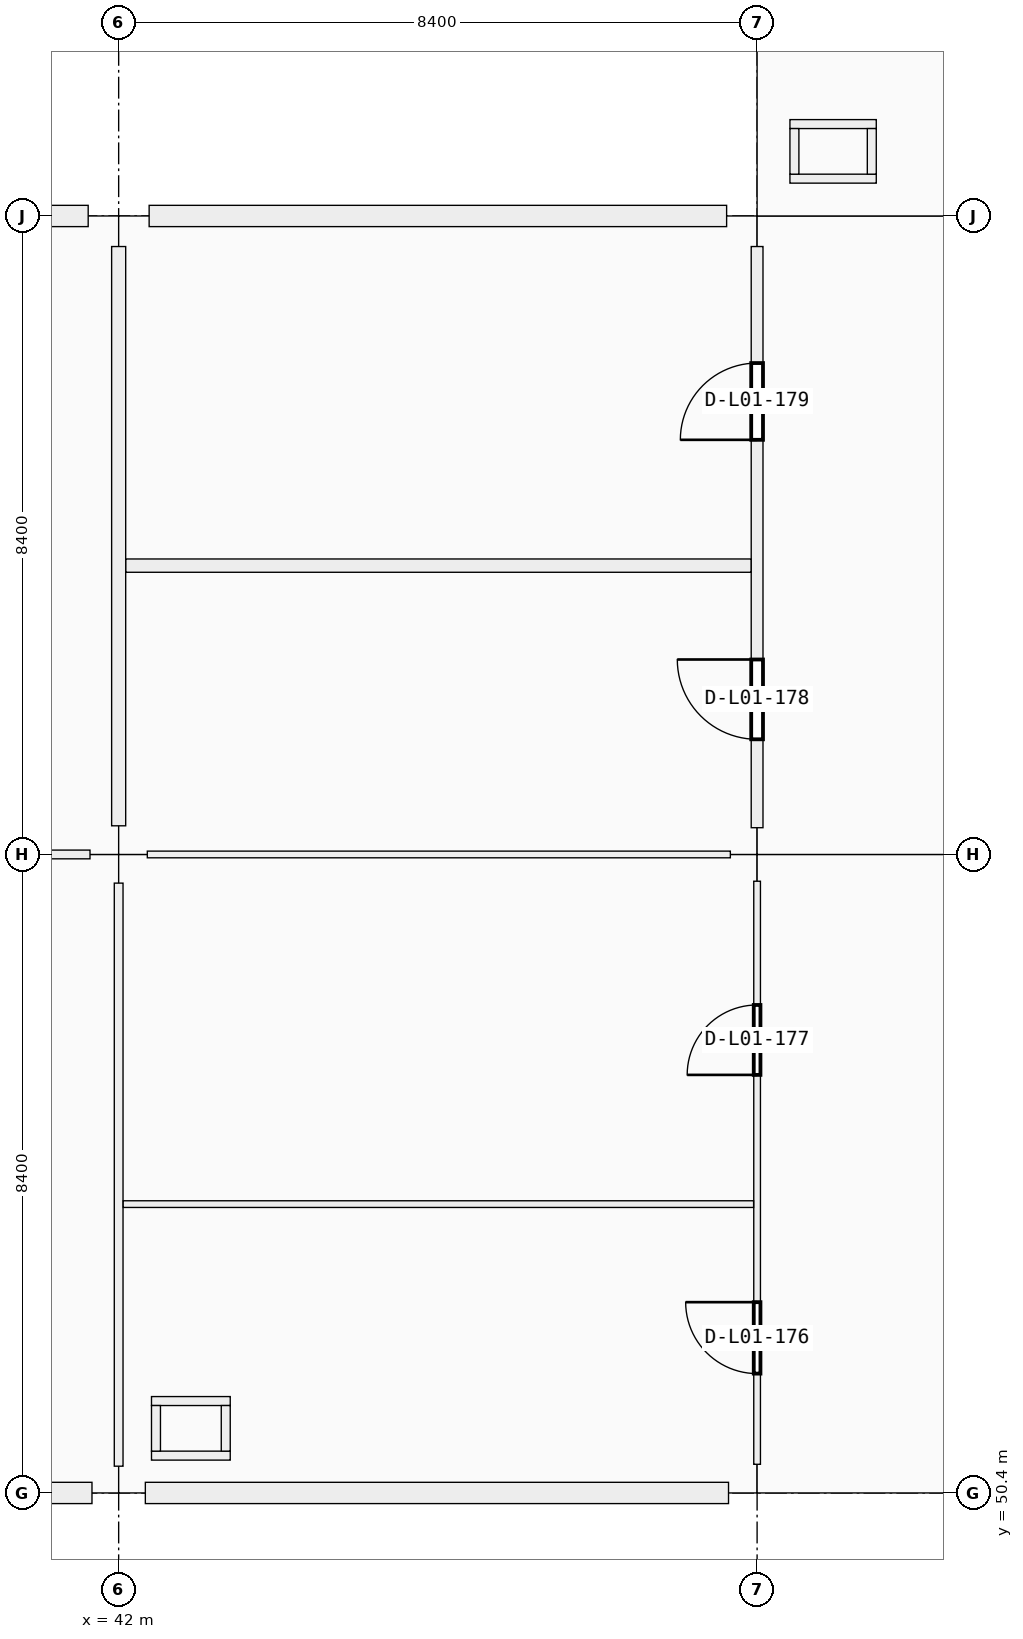
"""IFC4 building model, lengths in metres.
Left out: names, types, materials, properties, quantities, classifications, styles, units other than length and angle.
Written with IfcOpenShell. Run it as: python <this file> out.ifc"""

import sys

from ifc_helpers import new_model, si_unit, direction, frame, frame_2d, origin, origin_2d, place, context, subcontext, project, spatial, rectangle, extrude, element, fill, save


model = new_model("IFC4")
c1 = context("Model", 3, precision=1e-05, world=origin(), true_north=direction((0.0, 1.0)))
c2 = subcontext(c1, "Body", "Model", "MODEL_VIEW")
j1 = project(units=[si_unit("LENGTHUNIT", "METRE"), si_unit("PLANEANGLEUNIT", "RADIAN")], contexts=[c1])
p1 = place(None, origin())
s1 = spatial("IfcSite", under=j1, at=p1, CompositionType="ELEMENT")
p2 = place(p1, origin())
s2 = spatial("IfcBuilding", under=s1, at=p2, CompositionType="ELEMENT")
p3 = place(p2, frame((0.0, 0.0, 5.76)))
s3 = spatial("IfcBuildingStorey", under=s2, at=p3, CompositionType="ELEMENT", Elevation=5.76)
p4 = place(p3, frame((42.0, 50.4, 0.0), z_axis=(0.0, 0.0, 1.0), x_axis=(1.0, 0.0, 0.0)))
e1 = element("IfcColumn", 1, at=p4, inside=s3, PredefinedType="COLUMN", context=c2, shape_type="SweptSolid", body=[
    extrude(rectangle(XDim=0.7, YDim=0.7, at=origin_2d()), origin(), (0.0, 0.0, 1.0), 4.5),
])
p5 = place(p3, frame((42.0, 58.8, 0.0), z_axis=(0.0, 0.0, 1.0), x_axis=(1.0, 0.0, 0.0)))
e2 = element("IfcColumn", 2, at=p5, inside=s3, PredefinedType="COLUMN", context=c2, shape_type="SweptSolid", body=[
    extrude(rectangle(XDim=0.75, YDim=0.75, at=origin_2d()), origin(), (0.0, 0.0, 1.0), 4.5),
])
p6 = place(p3, frame((42.0, 67.2, 0.0), z_axis=(0.0, 0.0, 1.0), x_axis=(1.0, 0.0, 0.0)))
e3 = element("IfcColumn", 3, at=p6, inside=s3, PredefinedType="COLUMN", context=c2, shape_type="SweptSolid", body=[
    extrude(rectangle(XDim=0.8, YDim=0.8, at=origin_2d()), origin(), (0.0, 0.0, 1.0), 4.5),
])
p7 = place(p3, frame((50.4, 50.4, 0.0), z_axis=(0.0, 0.0, 1.0), x_axis=(1.0, 0.0, 0.0)))
e4 = element("IfcColumn", 4, at=p7, inside=s3, PredefinedType="COLUMN", context=c2, shape_type="SweptSolid", body=[
    extrude(rectangle(XDim=0.75, YDim=0.75, at=origin_2d()), origin(), (0.0, 0.0, 1.0), 4.5),
])
p8 = place(p3, frame((50.4, 58.8, 0.0), z_axis=(0.0, 0.0, 1.0), x_axis=(1.0, 0.0, 0.0)))
e5 = element("IfcColumn", 5, at=p8, inside=s3, PredefinedType="COLUMN", context=c2, shape_type="SweptSolid", body=[
    extrude(rectangle(XDim=0.7, YDim=0.7, at=origin_2d()), origin(), (0.0, 0.0, 1.0), 4.5),
])
p9 = place(p3, frame((50.4, 67.2, 0.0), z_axis=(0.0, 0.0, 1.0), x_axis=(1.0, 0.0, 0.0)))
e6 = element("IfcColumn", 6, at=p9, inside=s3, PredefinedType="COLUMN", context=c2, shape_type="SweptSolid", body=[
    extrude(rectangle(XDim=0.8, YDim=0.8, at=origin_2d()), origin(), (0.0, 0.0, 1.0), 4.5),
])
p10 = place(p3, frame((41.649, 50.4, 0.0), z_axis=(0.0, 0.0, 1.0), x_axis=(-1.0, 0.0, 0.0)))
e7 = element("IfcWall", 7, at=p10, inside=s3, PredefinedType="SOLIDWALL", context=c2, shape_type="SweptSolid", body=[
    extrude(rectangle(XDim=7.648, YDim=0.28, at=frame_2d((3.824, 0.0))), origin(), (0.0, 0.0, 1.0), 3.4),
])
p11 = place(p3, frame((34.001, 67.2, 0.0), z_axis=(0.0, 0.0, 1.0), x_axis=(1.0, 0.0, 0.0)))
e8 = element("IfcWall", 8, at=p11, inside=s3, PredefinedType="SOLIDWALL", context=c2, shape_type="SweptSolid", body=[
    extrude(rectangle(XDim=7.598, YDim=0.28, at=frame_2d((3.799, 0.0))), origin(), (0.0, 0.0, 1.0), 3.4),
])
p12 = place(p11, frame((3.149, 0.0, 0.9)))
e9 = element("IfcOpeningElement", 9, at=p12, cuts=e8, PredefinedType="OPENING", context=c2, shape_type="SweptSolid", body=[
    extrude(rectangle(XDim=1.3, YDim=1.95, at=frame_2d((0.65, 0.975))), frame((0.0, 0.14, 0.0), z_axis=(0.0, -1.0, 0.0), x_axis=(1.0, 0.0, 0.0)), (0.0, 0.0, 1.0), 0.28),
])
p13 = place(p3, frame((50.024, 50.4, 0.0), z_axis=(0.0, 0.0, 1.0), x_axis=(-1.0, 0.0, 0.0)))
e10 = element("IfcWall", 10, at=p13, inside=s3, PredefinedType="SOLIDWALL", context=c2, shape_type="SweptSolid", body=[
    extrude(rectangle(XDim=7.673, YDim=0.28, at=frame_2d((3.836, 0.0))), origin(), (0.0, 0.0, 1.0), 3.4),
])
p14 = place(p13, frame((2.462, 0.0, 0.9)))
e11 = element("IfcOpeningElement", 11, at=p14, cuts=e10, PredefinedType="OPENING", context=c2, shape_type="SweptSolid", body=[
    extrude(rectangle(XDim=2.75, YDim=1.6, at=frame_2d((1.375, 0.8))), frame((0.0, 0.14, 0.0), z_axis=(0.0, -1.0, 0.0), x_axis=(1.0, 0.0, 0.0)), (0.0, 0.0, 1.0), 0.28),
])
p15 = place(p3, frame((42.401, 67.2, 0.0), z_axis=(0.0, 0.0, 1.0), x_axis=(1.0, 0.0, 0.0)))
e12 = element("IfcWall", 12, at=p15, inside=s3, PredefinedType="SOLIDWALL", context=c2, shape_type="SweptSolid", body=[
    extrude(rectangle(XDim=7.598, YDim=0.28, at=frame_2d((3.799, 0.0))), origin(), (0.0, 0.0, 1.0), 3.4),
])
p16 = place(p15, frame((3.024, 0.0, 0.9)))
e13 = element("IfcOpeningElement", 13, at=p16, cuts=e12, PredefinedType="OPENING", context=c2, shape_type="SweptSolid", body=[
    extrude(rectangle(XDim=1.55, YDim=1.6, at=frame_2d((0.775, 0.8))), frame((0.0, 0.14, 0.0), z_axis=(0.0, -1.0, 0.0), x_axis=(1.0, 0.0, 0.0)), (0.0, 0.0, 1.0), 0.28),
])
for number, where, z_axis, x_axis in (
    (14, (42.432, 50.891, 0.0), (0.0, 0.0, 1.0), (1.0, 0.0, 0.0)),
    (15, (42.432, 51.609, 0.0), (0.0, 0.0, 1.0), (1.0, 0.0, 0.0)),
):
    element("IfcWall", number, at=place(p3, frame(where, z_axis=z_axis, x_axis=x_axis)), inside=s3, PredefinedType="PARTITIONING", context=c2, shape_type="SweptSolid", body=[
        extrude(rectangle(XDim=1.036, YDim=0.118, at=frame_2d((0.518, 0.0))), origin(), (0.0, 0.0, 1.0), 3.48),
    ])
for number, where, z_axis, x_axis in (
    (16, (42.491, 50.95, 0.0), (0.0, 0.0, 1.0), (0.0, 1.0, 0.0)),
    (17, (43.409, 50.95, 0.0), (0.0, 0.0, 1.0), (0.0, 1.0, 0.0)),
):
    element("IfcWall", number, at=place(p3, frame(where, z_axis=z_axis, x_axis=x_axis)), inside=s3, PredefinedType="PARTITIONING", context=c2, shape_type="SweptSolid", body=[
        extrude(rectangle(XDim=0.6, YDim=0.118, at=frame_2d((0.3, 0.0))), origin(), (0.0, 0.0, 1.0), 3.48),
    ])
for number, where, z_axis, x_axis in (
    (18, (50.832, 67.691, 0.0), (0.0, 0.0, 1.0), (1.0, 0.0, 0.0)),
    (19, (50.832, 68.409, 0.0), (0.0, 0.0, 1.0), (1.0, 0.0, 0.0)),
):
    element("IfcWall", number, at=place(p3, frame(where, z_axis=z_axis, x_axis=x_axis)), inside=s3, PredefinedType="PARTITIONING", context=c2, shape_type="SweptSolid", body=[
        extrude(rectangle(XDim=1.136, YDim=0.118, at=frame_2d((0.568, 0.0))), origin(), (0.0, 0.0, 1.0), 3.48),
    ])
for number, where, z_axis, x_axis in (
    (20, (50.891, 67.75, 0.0), (0.0, 0.0, 1.0), (0.0, 1.0, 0.0)),
    (21, (51.909, 67.75, 0.0), (0.0, 0.0, 1.0), (0.0, 1.0, 0.0)),
):
    element("IfcWall", number, at=place(p3, frame(where, z_axis=z_axis, x_axis=x_axis)), inside=s3, PredefinedType="PARTITIONING", context=c2, shape_type="SweptSolid", body=[
        extrude(rectangle(XDim=0.6, YDim=0.118, at=frame_2d((0.3, 0.0))), origin(), (0.0, 0.0, 1.0), 3.48),
    ])
p17 = place(p3, frame((34.002, 58.8, 0.0), z_axis=(0.0, 0.0, 1.0), x_axis=(1.0, 0.0, 0.0)))
e22 = element("IfcWall", 22, at=p17, inside=s3, PredefinedType="PARTITIONING", context=c2, shape_type="SweptSolid", body=[
    extrude(rectangle(XDim=7.621, YDim=0.115, at=frame_2d((3.811, 0.0))), origin(), (0.0, 0.0, 1.0), 2.4),
])
p18 = place(p17, frame((3.28, 0.0, 0.0)))
e23 = element("IfcOpeningElement", 23, at=p18, cuts=e22, PredefinedType="OPENING", context=c2, shape_type="SweptSolid", body=[
    extrude(rectangle(XDim=1.06, YDim=2.22, at=frame_2d((0.53, 1.11))), frame((0.0, 0.058, 0.0), z_axis=(0.0, -1.0, 0.0), x_axis=(1.0, 0.0, 0.0)), (0.0, 0.0, 1.0), 0.115),
])
p19 = place(p3, frame((42.377, 58.8, 0.0), z_axis=(0.0, 0.0, 1.0), x_axis=(1.0, 0.0, 0.0)))
e24 = element("IfcWall", 24, at=p19, inside=s3, PredefinedType="PARTITIONING", context=c2, shape_type="SweptSolid", body=[
    extrude(rectangle(XDim=7.671, YDim=0.088, at=frame_2d((3.835, 0.0))), origin(), (0.0, 0.0, 1.0), 2.4),
])
p20 = place(p3, frame((42.0, 50.752, 0.0), z_axis=(0.0, 0.0, 1.0), x_axis=(0.0, 1.0, 0.0)))
e25 = element("IfcWall", 25, at=p20, inside=s3, PredefinedType="PARTITIONING", context=c2, shape_type="SweptSolid", body=[
    extrude(rectangle(XDim=7.671, YDim=0.115, at=frame_2d((3.835, 0.0))), origin(), (0.0, 0.0, 1.0), 2.4),
])
p21 = place(p3, frame((42.0, 59.177, 0.0), z_axis=(0.0, 0.0, 1.0), x_axis=(0.0, 1.0, 0.0)))
e26 = element("IfcWall", 26, at=p21, inside=s3, PredefinedType="PARTITIONING", context=c2, shape_type="SweptSolid", body=[
    extrude(rectangle(XDim=7.621, YDim=0.185, at=frame_2d((3.811, 0.0))), origin(), (0.0, 0.0, 1.0), 2.4),
])
p22 = place(p3, frame((50.4, 50.777, 0.0), z_axis=(0.0, 0.0, 1.0), x_axis=(0.0, 1.0, 0.0)))
e27 = element("IfcWall", 27, at=p22, inside=s3, PredefinedType="PARTITIONING", context=c2, shape_type="SweptSolid", body=[
    extrude(rectangle(XDim=7.671, YDim=0.088, at=frame_2d((3.835, 0.0))), origin(), (0.0, 0.0, 1.0), 2.4),
])
p23 = place(p22, frame((1.193, 0.0, 0.0)))
e28 = element("IfcOpeningElement", 28, at=p23, cuts=e27, PredefinedType="OPENING", context=c2, shape_type="SweptSolid", body=[
    extrude(rectangle(XDim=0.94, YDim=2.15, at=frame_2d((0.47, 1.075))), frame((0.0, 0.044, 0.0), z_axis=(0.0, -1.0, 0.0), x_axis=(1.0, 0.0, 0.0)), (0.0, 0.0, 1.0), 0.088),
])
p24 = place(p22, frame((5.123, 0.0, 0.0)))
e29 = element("IfcOpeningElement", 29, at=p24, cuts=e27, PredefinedType="OPENING", context=c2, shape_type="SweptSolid", body=[
    extrude(rectangle(XDim=0.92, YDim=2.15, at=frame_2d((0.46, 1.075))), frame((0.0, 0.044, 0.0), z_axis=(0.0, -1.0, 0.0), x_axis=(1.0, 0.0, 0.0)), (0.0, 0.0, 1.0), 0.088),
])
p25 = place(p3, frame((50.4, 59.152, 0.0), z_axis=(0.0, 0.0, 1.0), x_axis=(0.0, 1.0, 0.0)))
e30 = element("IfcWall", 30, at=p25, inside=s3, PredefinedType="PARTITIONING", context=c2, shape_type="SweptSolid", body=[
    extrude(rectangle(XDim=7.646, YDim=0.155, at=frame_2d((3.823, 0.0))), origin(), (0.0, 0.0, 1.0), 2.4),
])
p26 = place(p25, frame((1.163, 0.0, 0.0)))
e31 = element("IfcOpeningElement", 31, at=p26, cuts=e30, PredefinedType="OPENING", context=c2, shape_type="SweptSolid", body=[
    extrude(rectangle(XDim=1.05, YDim=2.12, at=frame_2d((0.525, 1.06))), frame((0.0, 0.078, 0.0), z_axis=(0.0, -1.0, 0.0), x_axis=(1.0, 0.0, 0.0)), (0.0, 0.0, 1.0), 0.155),
])
p27 = place(p25, frame((5.103, 0.0, 0.0)))
e32 = element("IfcOpeningElement", 32, at=p27, cuts=e30, PredefinedType="OPENING", context=c2, shape_type="SweptSolid", body=[
    extrude(rectangle(XDim=1.01, YDim=2.12, at=frame_2d((0.505, 1.06))), frame((0.0, 0.078, 0.0), z_axis=(0.0, -1.0, 0.0), x_axis=(1.0, 0.0, 0.0)), (0.0, 0.0, 1.0), 0.155),
])
p28 = place(p3, frame((42.06, 54.2, 0.0), z_axis=(0.0, 0.0, 1.0), x_axis=(1.0, 0.0, 0.0)))
e33 = element("IfcWall", 33, at=p28, inside=s3, PredefinedType="PARTITIONING", context=c2, shape_type="SweptSolid", body=[
    extrude(rectangle(XDim=8.294, YDim=0.088, at=frame_2d((4.147, 0.0))), origin(), (0.0, 0.0, 1.0), 2.4),
])
p29 = place(p3, frame((42.094, 62.6, 0.0), z_axis=(0.0, 0.0, 1.0), x_axis=(1.0, 0.0, 0.0)))
e34 = element("IfcWall", 34, at=p29, inside=s3, PredefinedType="PARTITIONING", context=c2, shape_type="SweptSolid", body=[
    extrude(rectangle(XDim=8.226, YDim=0.175, at=frame_2d((4.113, 0.0))), origin(), (0.0, 0.0, 1.0), 2.4),
])
p30 = place(p14, origin())
e35 = element("IfcWindow", 35, at=p30, inside=s3, PartitioningType="SINGLE_PANEL", PredefinedType="WINDOW", context=c2, shape_type="SweptSolid", body=[
    extrude(rectangle(XDim=2.75, YDim=1.6, at=frame_2d((1.375, 0.8))), frame((0.0, 0.03, 0.0), z_axis=(0.0, -1.0, 0.0), x_axis=(1.0, 0.0, 0.0)), (0.0, 0.0, 1.0), 0.06),
])
fill(e11, e35)
p31 = place(p16, origin())
e36 = element("IfcWindow", 36, at=p31, inside=s3, PartitioningType="SINGLE_PANEL", PredefinedType="WINDOW", context=c2, shape_type="SweptSolid", body=[
    extrude(rectangle(XDim=1.55, YDim=1.6, at=frame_2d((0.775, 0.8))), frame((0.0, 0.03, 0.0), z_axis=(0.0, -1.0, 0.0), x_axis=(1.0, 0.0, 0.0)), (0.0, 0.0, 1.0), 0.06),
])
fill(e13, e36)
p32 = place(p23, origin())
e37 = element("IfcDoor", 37, at=p32, inside=s3, OperationType="SINGLE_SWING_RIGHT", PredefinedType="DOOR", context=c2, shape_type="SweptSolid", body=[
    extrude(rectangle(XDim=0.94, YDim=2.15, at=frame_2d((0.47, 1.075))), frame((0.0, 0.025, 0.0), z_axis=(0.0, -1.0, 0.0), x_axis=(1.0, 0.0, 0.0)), (0.0, 0.0, 1.0), 0.05),
])
fill(e28, e37)
p33 = place(p24, origin())
e38 = element("IfcDoor", 38, at=p33, inside=s3, OperationType="SINGLE_SWING_LEFT", PredefinedType="DOOR", context=c2, shape_type="SweptSolid", body=[
    extrude(rectangle(XDim=0.92, YDim=2.15, at=frame_2d((0.46, 1.075))), frame((0.0, 0.025, 0.0), z_axis=(0.0, -1.0, 0.0), x_axis=(1.0, 0.0, 0.0)), (0.0, 0.0, 1.0), 0.05),
])
fill(e29, e38)
p34 = place(p26, origin())
e39 = element("IfcDoor", 39, at=p34, inside=s3, OperationType="SINGLE_SWING_RIGHT", PredefinedType="DOOR", context=c2, shape_type="SweptSolid", body=[
    extrude(rectangle(XDim=1.05, YDim=2.12, at=frame_2d((0.525, 1.06))), frame((0.0, 0.025, 0.0), z_axis=(0.0, -1.0, 0.0), x_axis=(1.0, 0.0, 0.0)), (0.0, 0.0, 1.0), 0.05),
])
fill(e31, e39)
p35 = place(p27, origin())
e40 = element("IfcDoor", 40, at=p35, inside=s3, OperationType="SINGLE_SWING_LEFT", PredefinedType="DOOR", context=c2, shape_type="SweptSolid", body=[
    extrude(rectangle(XDim=1.01, YDim=2.12, at=frame_2d((0.505, 1.06))), frame((0.0, 0.025, 0.0), z_axis=(0.0, -1.0, 0.0), x_axis=(1.0, 0.0, 0.0)), (0.0, 0.0, 1.0), 0.05),
])
fill(e32, e40)
save(model, sys.argv[1])
